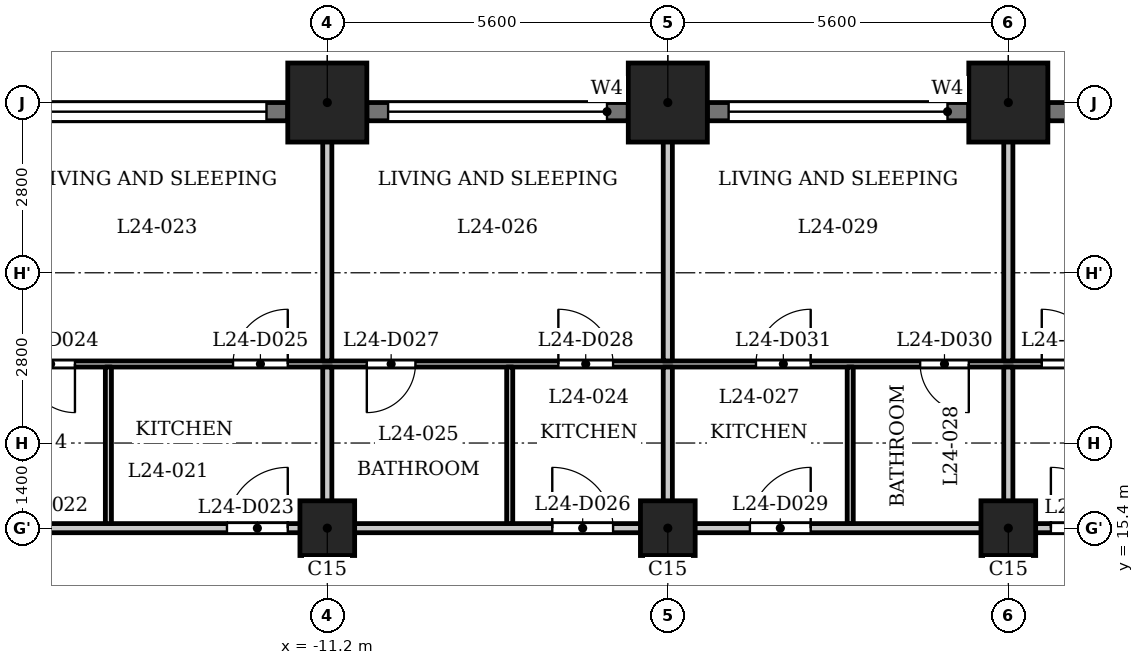
"""IFC4 building model, lengths in metres.
Left out: names, types, materials, properties, quantities, classifications, styles, units other than length and angle.
Written with IfcOpenShell. Run it as: python <this file> out.ifc"""

import sys

from ifc_helpers import new_model, si_unit, direction, frame, frame_2d, origin, origin_2d, place, context, subcontext, project, spatial, rectangle, extrude, element, fill, save


model = new_model("IFC4")
c1 = context("Model", 3, precision=1e-05, world=origin(), true_north=direction((0.0, 1.0)))
c2 = subcontext(c1, "Body", "Model", "MODEL_VIEW")
j1 = project(units=[si_unit("LENGTHUNIT", "METRE"), si_unit("PLANEANGLEUNIT", "RADIAN")], contexts=[c1])
p1 = place(None, origin())
s1 = spatial("IfcSite", under=j1, at=p1, CompositionType="ELEMENT")
p2 = place(p1, origin())
s2 = spatial("IfcBuilding", under=s1, at=p2, CompositionType="ELEMENT")
p3 = place(p2, frame((0.0, 0.0, 97.3)))
s3 = spatial("IfcBuildingStorey", under=s2, at=p3, CompositionType="ELEMENT", Elevation=97.3)
for number, where, z_axis, x_axis in (
    (1, (0.0, 22.4, 0.0), (0.0, 0.0, 1.0), (1.0, 0.0, 0.0)),
    (2, (-5.6, 22.4, 0.0), (0.0, 0.0, 1.0), (1.0, 0.0, 0.0)),
    (3, (-11.2, 22.4, 0.0), (0.0, 0.0, 1.0), (1.0, 0.0, 0.0)),
):
    element("IfcColumn", number, at=place(p3, frame(where, z_axis=z_axis, x_axis=x_axis)), inside=s3, PredefinedType="COLUMN", context=c2, shape_type="SweptSolid", body=[
        extrude(rectangle(XDim=1.3, YDim=1.3, at=origin_2d()), origin(), (0.0, 0.0, 1.0), 3.5),
    ])
for number, where, z_axis, x_axis in (
    (4, (-11.2, 15.4, 0.0), (0.0, 0.0, 1.0), (1.0, 0.0, 0.0)),
    (5, (-5.6, 15.4, 0.0), (0.0, 0.0, 1.0), (1.0, 0.0, 0.0)),
    (6, (0.0, 15.4, 0.0), (0.0, 0.0, 1.0), (1.0, 0.0, 0.0)),
):
    element("IfcColumn", number, at=place(p3, frame(where, z_axis=z_axis, x_axis=x_axis)), inside=s3, PredefinedType="COLUMN", context=c2, shape_type="SweptSolid", body=[
        extrude(rectangle(XDim=0.9, YDim=0.9, at=origin_2d()), origin(), (0.0, 0.0, 1.0), 3.5),
    ])
p4 = place(p3, frame((4.95, 22.25, 0.0), z_axis=(0.0, 0.0, 1.0), x_axis=(-1.0, 0.0, 0.0)))
e7 = element("IfcWall", 7, at=p4, inside=s3, PredefinedType="SOLIDWALL", context=c2, shape_type="SweptSolid", body=[
    extrude(rectangle(XDim=4.3, YDim=0.3, at=frame_2d((2.15, 0.0))), origin(), (0.0, 0.0, 1.0), 2.4),
])
p5 = place(p4, frame((0.35, 0.0, 1.2)))
e8 = element("IfcOpeningElement", 8, at=p5, cuts=e7, PredefinedType="OPENING", context=c2, shape_type="SweptSolid", body=[
    extrude(rectangle(XDim=3.6, YDim=0.95, at=frame_2d((1.8, 0.475))), frame((0.0, 0.16, 0.0), z_axis=(0.0, -1.0, 0.0), x_axis=(1.0, 0.0, 0.0)), (0.0, 0.0, 1.0), 0.32),
])
p6 = place(p3, frame((-0.65, 22.25, 0.0), z_axis=(0.0, 0.0, 1.0), x_axis=(-1.0, 0.0, 0.0)))
e9 = element("IfcWall", 9, at=p6, inside=s3, PredefinedType="SOLIDWALL", context=c2, shape_type="SweptSolid", body=[
    extrude(rectangle(XDim=4.3, YDim=0.3, at=frame_2d((2.15, 0.0))), origin(), (0.0, 0.0, 1.0), 2.4),
])
p7 = place(p6, frame((0.35, 0.0, 1.2)))
e10 = element("IfcOpeningElement", 10, at=p7, cuts=e9, PredefinedType="OPENING", context=c2, shape_type="SweptSolid", body=[
    extrude(rectangle(XDim=3.6, YDim=0.95, at=frame_2d((1.8, 0.475))), frame((0.0, 0.16, 0.0), z_axis=(0.0, -1.0, 0.0), x_axis=(1.0, 0.0, 0.0)), (0.0, 0.0, 1.0), 0.32),
])
p8 = place(p3, frame((-6.25, 22.25, 0.0), z_axis=(0.0, 0.0, 1.0), x_axis=(-1.0, 0.0, 0.0)))
e11 = element("IfcWall", 11, at=p8, inside=s3, PredefinedType="SOLIDWALL", context=c2, shape_type="SweptSolid", body=[
    extrude(rectangle(XDim=4.3, YDim=0.3, at=frame_2d((2.15, 0.0))), origin(), (0.0, 0.0, 1.0), 2.4),
])
p9 = place(p8, frame((0.35, 0.0, 1.2)))
e12 = element("IfcOpeningElement", 12, at=p9, cuts=e11, PredefinedType="OPENING", context=c2, shape_type="SweptSolid", body=[
    extrude(rectangle(XDim=3.6, YDim=0.95, at=frame_2d((1.8, 0.475))), frame((0.0, 0.16, 0.0), z_axis=(0.0, -1.0, 0.0), x_axis=(1.0, 0.0, 0.0)), (0.0, 0.0, 1.0), 0.32),
])
p10 = place(p3, frame((-11.85, 22.25, 0.0), z_axis=(0.0, 0.0, 1.0), x_axis=(-1.0, 0.0, 0.0)))
e13 = element("IfcWall", 13, at=p10, inside=s3, PredefinedType="SOLIDWALL", context=c2, shape_type="SweptSolid", body=[
    extrude(rectangle(XDim=4.3, YDim=0.3, at=frame_2d((2.15, 0.0))), origin(), (0.0, 0.0, 1.0), 2.4),
])
p11 = place(p10, frame((0.35, 0.0, 1.2)))
e14 = element("IfcOpeningElement", 14, at=p11, cuts=e13, PredefinedType="OPENING", context=c2, shape_type="SweptSolid", body=[
    extrude(rectangle(XDim=3.6, YDim=0.95, at=frame_2d((1.8, 0.475))), frame((0.0, 0.16, 0.0), z_axis=(0.0, -1.0, 0.0), x_axis=(1.0, 0.0, 0.0)), (0.0, 0.0, 1.0), 0.32),
])
p12 = place(p3, frame((-27.484, 15.4, 0.0), z_axis=(0.0, 0.0, 1.0), x_axis=(1.0, 0.0, 0.0)))
e15 = element("IfcWall", 15, at=p12, inside=s3, PredefinedType="PARTITIONING", context=c2, shape_type="SweptSolid", body=[
    extrude(rectangle(XDim=54.968, YDim=0.15, at=frame_2d((27.484, 0.0))), origin(), (0.0, 0.0, 1.0), 3.2),
])
p13 = place(p12, frame((9.034, 0.0, 0.0)))
e16 = element("IfcOpeningElement", 16, at=p13, cuts=e15, PredefinedType="OPENING", context=c2, shape_type="SweptSolid", body=[
    extrude(rectangle(XDim=1.0, YDim=2.1, at=frame_2d((0.5, 1.05))), frame((0.0, 0.085, 0.0), z_axis=(0.0, -1.0, 0.0), x_axis=(1.0, 0.0, 0.0)), (0.0, 0.0, 1.0), 0.17),
])
p14 = place(p12, frame((14.634, 0.0, 0.0)))
e17 = element("IfcOpeningElement", 17, at=p14, cuts=e15, PredefinedType="OPENING", context=c2, shape_type="SweptSolid", body=[
    extrude(rectangle(XDim=1.0, YDim=2.1, at=frame_2d((0.5, 1.05))), frame((0.0, 0.085, 0.0), z_axis=(0.0, -1.0, 0.0), x_axis=(1.0, 0.0, 0.0)), (0.0, 0.0, 1.0), 0.17),
])
p15 = place(p12, frame((19.984, 0.0, 0.0)))
e18 = element("IfcOpeningElement", 18, at=p15, cuts=e15, PredefinedType="OPENING", context=c2, shape_type="SweptSolid", body=[
    extrude(rectangle(XDim=1.0, YDim=2.1, at=frame_2d((0.5, 1.05))), frame((0.0, 0.085, 0.0), z_axis=(0.0, -1.0, 0.0), x_axis=(1.0, 0.0, 0.0)), (0.0, 0.0, 1.0), 0.17),
])
p16 = place(p12, frame((23.234, 0.0, 0.0)))
e19 = element("IfcOpeningElement", 19, at=p16, cuts=e15, PredefinedType="OPENING", context=c2, shape_type="SweptSolid", body=[
    extrude(rectangle(XDim=1.0, YDim=2.1, at=frame_2d((0.5, 1.05))), frame((0.0, 0.085, 0.0), z_axis=(0.0, -1.0, 0.0), x_axis=(1.0, 0.0, 0.0)), (0.0, 0.0, 1.0), 0.17),
])
p17 = place(p12, frame((28.184, 0.0, 0.0)))
e20 = element("IfcOpeningElement", 20, at=p17, cuts=e15, PredefinedType="OPENING", context=c2, shape_type="SweptSolid", body=[
    extrude(rectangle(XDim=1.0, YDim=2.1, at=frame_2d((0.5, 1.05))), frame((0.0, 0.085, 0.0), z_axis=(0.0, -1.0, 0.0), x_axis=(1.0, 0.0, 0.0)), (0.0, 0.0, 1.0), 0.17),
])
p18 = place(p12, frame((39.284, 0.0, 0.0)))
e21 = element("IfcOpeningElement", 21, at=p18, cuts=e15, PredefinedType="OPENING", context=c2, shape_type="SweptSolid", body=[
    extrude(rectangle(XDim=1.0, YDim=2.1, at=frame_2d((0.5, 1.05))), frame((0.0, 0.085, 0.0), z_axis=(0.0, -1.0, 0.0), x_axis=(1.0, 0.0, 0.0)), (0.0, 0.0, 1.0), 0.17),
])
p19 = place(p12, frame((48.234, 0.0, 0.0)))
e22 = element("IfcOpeningElement", 22, at=p19, cuts=e15, PredefinedType="OPENING", context=c2, shape_type="SweptSolid", body=[
    extrude(rectangle(XDim=1.0, YDim=2.1, at=frame_2d((0.5, 1.05))), frame((0.0, 0.085, 0.0), z_axis=(0.0, -1.0, 0.0), x_axis=(1.0, 0.0, 0.0)), (0.0, 0.0, 1.0), 0.17),
])
p20 = place(p3, frame((-26.44, 18.1, 0.0), z_axis=(0.0, 0.0, 1.0), x_axis=(1.0, 0.0, 0.0)))
e23 = element("IfcWall", 23, at=p20, inside=s3, PredefinedType="PARTITIONING", context=c2, shape_type="SweptSolid", body=[
    extrude(rectangle(XDim=52.63, YDim=0.1, at=frame_2d((26.315, 0.0))), origin(), (0.0, 0.0, 1.0), 3.2),
])
p21 = place(p20, frame((2.626, 0.0, 0.0)))
e24 = element("IfcOpeningElement", 24, at=p21, cuts=e23, PredefinedType="OPENING", context=c2, shape_type="SweptSolid", body=[
    extrude(rectangle(XDim=0.8, YDim=2.1, at=frame_2d((0.4, 1.05))), frame((0.0, 0.06, 0.0), z_axis=(0.0, -1.0, 0.0), x_axis=(1.0, 0.0, 0.0)), (0.0, 0.0, 1.0), 0.12),
])
p22 = place(p20, frame((8.09, 0.0, 0.0)))
e25 = element("IfcOpeningElement", 25, at=p22, cuts=e23, PredefinedType="OPENING", context=c2, shape_type="SweptSolid", body=[
    extrude(rectangle(XDim=0.9, YDim=2.1, at=frame_2d((0.45, 1.05))), frame((0.0, 0.06, 0.0), z_axis=(0.0, -1.0, 0.0), x_axis=(1.0, 0.0, 0.0)), (0.0, 0.0, 1.0), 0.12),
])
p23 = place(p20, frame((10.29, 0.0, 0.0)))
e26 = element("IfcOpeningElement", 26, at=p23, cuts=e23, PredefinedType="OPENING", context=c2, shape_type="SweptSolid", body=[
    extrude(rectangle(XDim=0.8, YDim=2.1, at=frame_2d((0.4, 1.05))), frame((0.0, 0.06, 0.0), z_axis=(0.0, -1.0, 0.0), x_axis=(1.0, 0.0, 0.0)), (0.0, 0.0, 1.0), 0.12),
])
p24 = place(p20, frame((13.69, 0.0, 0.0)))
e27 = element("IfcOpeningElement", 27, at=p24, cuts=e23, PredefinedType="OPENING", context=c2, shape_type="SweptSolid", body=[
    extrude(rectangle(XDim=0.9, YDim=2.1, at=frame_2d((0.45, 1.05))), frame((0.0, 0.06, 0.0), z_axis=(0.0, -1.0, 0.0), x_axis=(1.0, 0.0, 0.0)), (0.0, 0.0, 1.0), 0.12),
])
p25 = place(p20, frame((15.89, 0.0, 0.0)))
e28 = element("IfcOpeningElement", 28, at=p25, cuts=e23, PredefinedType="OPENING", context=c2, shape_type="SweptSolid", body=[
    extrude(rectangle(XDim=0.8, YDim=2.1, at=frame_2d((0.4, 1.05))), frame((0.0, 0.06, 0.0), z_axis=(0.0, -1.0, 0.0), x_axis=(1.0, 0.0, 0.0)), (0.0, 0.0, 1.0), 0.12),
])
p26 = place(p20, frame((19.04, 0.0, 0.0)))
e29 = element("IfcOpeningElement", 29, at=p26, cuts=e23, PredefinedType="OPENING", context=c2, shape_type="SweptSolid", body=[
    extrude(rectangle(XDim=0.9, YDim=2.1, at=frame_2d((0.45, 1.05))), frame((0.0, 0.06, 0.0), z_axis=(0.0, -1.0, 0.0), x_axis=(1.0, 0.0, 0.0)), (0.0, 0.0, 1.0), 0.12),
])
p27 = place(p20, frame((24.99, 0.0, 0.0)))
e30 = element("IfcOpeningElement", 30, at=p27, cuts=e23, PredefinedType="OPENING", context=c2, shape_type="SweptSolid", body=[
    extrude(rectangle(XDim=0.8, YDim=2.1, at=frame_2d((0.4, 1.05))), frame((0.0, 0.06, 0.0), z_axis=(0.0, -1.0, 0.0), x_axis=(1.0, 0.0, 0.0)), (0.0, 0.0, 1.0), 0.12),
])
p28 = place(p20, frame((22.29, 0.0, 0.0)))
e31 = element("IfcOpeningElement", 31, at=p28, cuts=e23, PredefinedType="OPENING", context=c2, shape_type="SweptSolid", body=[
    extrude(rectangle(XDim=0.9, YDim=2.1, at=frame_2d((0.45, 1.05))), frame((0.0, 0.06, 0.0), z_axis=(0.0, -1.0, 0.0), x_axis=(1.0, 0.0, 0.0)), (0.0, 0.0, 1.0), 0.12),
])
p29 = place(p20, frame((32.69, 0.0, 0.0)))
e32 = element("IfcOpeningElement", 32, at=p29, cuts=e23, PredefinedType="OPENING", context=c2, shape_type="SweptSolid", body=[
    extrude(rectangle(XDim=0.8, YDim=2.1, at=frame_2d((0.4, 1.05))), frame((0.0, 0.06, 0.0), z_axis=(0.0, -1.0, 0.0), x_axis=(1.0, 0.0, 0.0)), (0.0, 0.0, 1.0), 0.12),
])
p30 = place(p20, frame((26.99, 0.0, 0.0)))
e33 = element("IfcOpeningElement", 33, at=p30, cuts=e23, PredefinedType="OPENING", context=c2, shape_type="SweptSolid", body=[
    extrude(rectangle(XDim=0.9, YDim=2.1, at=frame_2d((0.45, 1.05))), frame((0.0, 0.06, 0.0), z_axis=(0.0, -1.0, 0.0), x_axis=(1.0, 0.0, 0.0)), (0.0, 0.0, 1.0), 0.12),
])
p31 = place(p20, frame((41.29, 0.0, 0.0)))
e34 = element("IfcOpeningElement", 34, at=p31, cuts=e23, PredefinedType="OPENING", context=c2, shape_type="SweptSolid", body=[
    extrude(rectangle(XDim=0.8, YDim=2.1, at=frame_2d((0.4, 1.05))), frame((0.0, 0.06, 0.0), z_axis=(0.0, -1.0, 0.0), x_axis=(1.0, 0.0, 0.0)), (0.0, 0.0, 1.0), 0.12),
])
p32 = place(p20, frame((38.34, 0.0, 0.0)))
e35 = element("IfcOpeningElement", 35, at=p32, cuts=e23, PredefinedType="OPENING", context=c2, shape_type="SweptSolid", body=[
    extrude(rectangle(XDim=0.9, YDim=2.1, at=frame_2d((0.45, 1.05))), frame((0.0, 0.06, 0.0), z_axis=(0.0, -1.0, 0.0), x_axis=(1.0, 0.0, 0.0)), (0.0, 0.0, 1.0), 0.12),
])
p33 = place(p20, frame((50.74, 0.0, 0.0)))
e36 = element("IfcOpeningElement", 36, at=p33, cuts=e23, PredefinedType="OPENING", context=c2, shape_type="SweptSolid", body=[
    extrude(rectangle(XDim=0.8, YDim=2.1, at=frame_2d((0.4, 1.05))), frame((0.0, 0.06, 0.0), z_axis=(0.0, -1.0, 0.0), x_axis=(1.0, 0.0, 0.0)), (0.0, 0.0, 1.0), 0.12),
])
p34 = place(p20, frame((47.29, 0.0, 0.0)))
e37 = element("IfcOpeningElement", 37, at=p34, cuts=e23, PredefinedType="OPENING", context=c2, shape_type="SweptSolid", body=[
    extrude(rectangle(XDim=0.9, YDim=2.1, at=frame_2d((0.45, 1.05))), frame((0.0, 0.06, 0.0), z_axis=(0.0, -1.0, 0.0), x_axis=(1.0, 0.0, 0.0)), (0.0, 0.0, 1.0), 0.12),
])
p35 = place(p3, frame((-14.8, 15.475, 0.0), z_axis=(0.0, 0.0, 1.0), x_axis=(0.0, 1.0, 0.0)))
e38 = element("IfcWall", 38, at=p35, inside=s3, PredefinedType="PARTITIONING", context=c2, shape_type="SweptSolid", body=[
    extrude(rectangle(XDim=2.575, YDim=0.1, at=frame_2d((1.288, 0.0))), origin(), (0.0, 0.0, 1.0), 3.2),
])
p36 = place(p3, frame((-11.2, 15.475, 0.0), z_axis=(0.0, 0.0, 1.0), x_axis=(0.0, 1.0, 0.0)))
e39 = element("IfcWall", 39, at=p36, inside=s3, PredefinedType="PARTITIONING", context=c2, shape_type="SweptSolid", body=[
    extrude(rectangle(XDim=2.575, YDim=0.15, at=frame_2d((1.288, 0.0))), origin(), (0.0, 0.0, 1.0), 3.2),
])
p37 = place(p3, frame((-11.2, 18.15, 0.0), z_axis=(0.0, 0.0, 1.0), x_axis=(0.0, 1.0, 0.0)))
e40 = element("IfcWall", 40, at=p37, inside=s3, PredefinedType="PARTITIONING", context=c2, shape_type="SweptSolid", body=[
    extrude(rectangle(XDim=4.88, YDim=0.15, at=frame_2d((2.44, 0.0))), origin(), (0.0, 0.0, 1.0), 3.2),
])
p38 = place(p3, frame((-8.2, 15.475, 0.0), z_axis=(0.0, 0.0, 1.0), x_axis=(0.0, 1.0, 0.0)))
e41 = element("IfcWall", 41, at=p38, inside=s3, PredefinedType="PARTITIONING", context=c2, shape_type="SweptSolid", body=[
    extrude(rectangle(XDim=2.575, YDim=0.1, at=frame_2d((1.288, 0.0))), origin(), (0.0, 0.0, 1.0), 3.2),
])
p39 = place(p3, frame((-5.6, 15.475, 0.0), z_axis=(0.0, 0.0, 1.0), x_axis=(0.0, 1.0, 0.0)))
e42 = element("IfcWall", 42, at=p39, inside=s3, PredefinedType="PARTITIONING", context=c2, shape_type="SweptSolid", body=[
    extrude(rectangle(XDim=2.575, YDim=0.15, at=frame_2d((1.288, 0.0))), origin(), (0.0, 0.0, 1.0), 3.2),
])
p40 = place(p3, frame((-5.6, 18.15, 0.0), z_axis=(0.0, 0.0, 1.0), x_axis=(0.0, 1.0, 0.0)))
e43 = element("IfcWall", 43, at=p40, inside=s3, PredefinedType="PARTITIONING", context=c2, shape_type="SweptSolid", body=[
    extrude(rectangle(XDim=4.88, YDim=0.15, at=frame_2d((2.44, 0.0))), origin(), (0.0, 0.0, 1.0), 3.2),
])
p41 = place(p3, frame((-2.6, 15.475, 0.0), z_axis=(0.0, 0.0, 1.0), x_axis=(0.0, 1.0, 0.0)))
e44 = element("IfcWall", 44, at=p41, inside=s3, PredefinedType="PARTITIONING", context=c2, shape_type="SweptSolid", body=[
    extrude(rectangle(XDim=2.575, YDim=0.1, at=frame_2d((1.288, 0.0))), origin(), (0.0, 0.0, 1.0), 3.2),
])
p42 = place(p3, frame((0.0, 15.475, 0.0), z_axis=(0.0, 0.0, 1.0), x_axis=(0.0, 1.0, 0.0)))
e45 = element("IfcWall", 45, at=p42, inside=s3, PredefinedType="PARTITIONING", context=c2, shape_type="SweptSolid", body=[
    extrude(rectangle(XDim=2.575, YDim=0.15, at=frame_2d((1.288, 0.0))), origin(), (0.0, 0.0, 1.0), 3.2),
])
p43 = place(p3, frame((0.0, 18.15, 0.0), z_axis=(0.0, 0.0, 1.0), x_axis=(0.0, 1.0, 0.0)))
e46 = element("IfcWall", 46, at=p43, inside=s3, PredefinedType="PARTITIONING", context=c2, shape_type="SweptSolid", body=[
    extrude(rectangle(XDim=4.88, YDim=0.15, at=frame_2d((2.44, 0.0))), origin(), (0.0, 0.0, 1.0), 3.2),
])
p44 = place(p14, origin())
e47 = element("IfcDoor", 47, at=p44, inside=s3, OperationType="SINGLE_SWING_LEFT", PredefinedType="DOOR", context=c2, shape_type="SweptSolid", body=[
    extrude(rectangle(XDim=1.0, YDim=2.1, at=frame_2d((0.5, 1.05))), frame((0.0, 0.025, 0.0), z_axis=(0.0, -1.0, 0.0), x_axis=(1.0, 0.0, 0.0)), (0.0, 0.0, 1.0), 0.05),
])
fill(e17, e47)
p45 = place(p23, origin())
e48 = element("IfcDoor", 48, at=p45, inside=s3, OperationType="SINGLE_SWING_RIGHT", PredefinedType="DOOR", context=c2, shape_type="SweptSolid", body=[
    extrude(rectangle(XDim=0.8, YDim=2.1, at=frame_2d((0.4, 1.05))), frame((0.0, 0.025, 0.0), z_axis=(0.0, -1.0, 0.0), x_axis=(1.0, 0.0, 0.0)), (0.0, 0.0, 1.0), 0.05),
])
fill(e26, e48)
p46 = place(p24, origin())
e49 = element("IfcDoor", 49, at=p46, inside=s3, OperationType="SINGLE_SWING_LEFT", PredefinedType="DOOR", context=c2, shape_type="SweptSolid", body=[
    extrude(rectangle(XDim=0.9, YDim=2.1, at=frame_2d((0.45, 1.05))), frame((0.0, 0.025, 0.0), z_axis=(0.0, -1.0, 0.0), x_axis=(1.0, 0.0, 0.0)), (0.0, 0.0, 1.0), 0.05),
])
fill(e27, e49)
p47 = place(p15, origin())
e50 = element("IfcDoor", 50, at=p47, inside=s3, OperationType="SINGLE_SWING_RIGHT", PredefinedType="DOOR", context=c2, shape_type="SweptSolid", body=[
    extrude(rectangle(XDim=1.0, YDim=2.1, at=frame_2d((0.5, 1.05))), frame((0.0, 0.025, 0.0), z_axis=(0.0, -1.0, 0.0), x_axis=(1.0, 0.0, 0.0)), (0.0, 0.0, 1.0), 0.05),
])
fill(e18, e50)
p48 = place(p25, origin())
e51 = element("IfcDoor", 51, at=p48, inside=s3, OperationType="SINGLE_SWING_LEFT", PredefinedType="DOOR", context=c2, shape_type="SweptSolid", body=[
    extrude(rectangle(XDim=0.8, YDim=2.1, at=frame_2d((0.4, 1.05))), frame((0.0, 0.025, 0.0), z_axis=(0.0, -1.0, 0.0), x_axis=(1.0, 0.0, 0.0)), (0.0, 0.0, 1.0), 0.05),
])
fill(e28, e51)
p49 = place(p26, origin())
e52 = element("IfcDoor", 52, at=p49, inside=s3, OperationType="SINGLE_SWING_RIGHT", PredefinedType="DOOR", context=c2, shape_type="SweptSolid", body=[
    extrude(rectangle(XDim=0.9, YDim=2.1, at=frame_2d((0.45, 1.05))), frame((0.0, 0.025, 0.0), z_axis=(0.0, -1.0, 0.0), x_axis=(1.0, 0.0, 0.0)), (0.0, 0.0, 1.0), 0.05),
])
fill(e29, e52)
p50 = place(p16, origin())
e53 = element("IfcDoor", 53, at=p50, inside=s3, OperationType="SINGLE_SWING_LEFT", PredefinedType="DOOR", context=c2, shape_type="SweptSolid", body=[
    extrude(rectangle(XDim=1.0, YDim=2.1, at=frame_2d((0.5, 1.05))), frame((0.0, 0.025, 0.0), z_axis=(0.0, -1.0, 0.0), x_axis=(1.0, 0.0, 0.0)), (0.0, 0.0, 1.0), 0.05),
])
fill(e19, e53)
p51 = place(p27, origin())
e54 = element("IfcDoor", 54, at=p51, inside=s3, OperationType="SINGLE_SWING_RIGHT", PredefinedType="DOOR", context=c2, shape_type="SweptSolid", body=[
    extrude(rectangle(XDim=0.8, YDim=2.1, at=frame_2d((0.4, 1.05))), frame((0.0, 0.025, 0.0), z_axis=(0.0, -1.0, 0.0), x_axis=(1.0, 0.0, 0.0)), (0.0, 0.0, 1.0), 0.05),
])
fill(e30, e54)
p52 = place(p28, origin())
e55 = element("IfcDoor", 55, at=p52, inside=s3, OperationType="SINGLE_SWING_LEFT", PredefinedType="DOOR", context=c2, shape_type="SweptSolid", body=[
    extrude(rectangle(XDim=0.9, YDim=2.1, at=frame_2d((0.45, 1.05))), frame((0.0, 0.025, 0.0), z_axis=(0.0, -1.0, 0.0), x_axis=(1.0, 0.0, 0.0)), (0.0, 0.0, 1.0), 0.05),
])
fill(e31, e55)
p53 = place(p17, origin())
e56 = element("IfcDoor", 56, at=p53, inside=s3, OperationType="SINGLE_SWING_RIGHT", PredefinedType="DOOR", context=c2, shape_type="SweptSolid", body=[
    extrude(rectangle(XDim=1.0, YDim=2.1, at=frame_2d((0.5, 1.05))), frame((0.0, 0.025, 0.0), z_axis=(0.0, -1.0, 0.0), x_axis=(1.0, 0.0, 0.0)), (0.0, 0.0, 1.0), 0.05),
])
fill(e20, e56)
p54 = place(p30, origin())
e57 = element("IfcDoor", 57, at=p54, inside=s3, OperationType="SINGLE_SWING_RIGHT", PredefinedType="DOOR", context=c2, shape_type="SweptSolid", body=[
    extrude(rectangle(XDim=0.9, YDim=2.1, at=frame_2d((0.45, 1.05))), frame((0.0, 0.025, 0.0), z_axis=(0.0, -1.0, 0.0), x_axis=(1.0, 0.0, 0.0)), (0.0, 0.0, 1.0), 0.05),
])
fill(e33, e57)
p55 = place(p7, origin())
e58 = element("IfcWindow", 58, at=p55, inside=s3, PartitioningType="SINGLE_PANEL", PredefinedType="WINDOW", context=c2, shape_type="SweptSolid", body=[
    extrude(rectangle(XDim=3.6, YDim=0.95, at=frame_2d((1.8, 0.475))), frame((0.0, 0.03, 0.0), z_axis=(0.0, -1.0, 0.0), x_axis=(1.0, 0.0, 0.0)), (0.0, 0.0, 1.0), 0.06),
])
fill(e10, e58)
p56 = place(p9, origin())
e59 = element("IfcWindow", 59, at=p56, inside=s3, PartitioningType="SINGLE_PANEL", PredefinedType="WINDOW", context=c2, shape_type="SweptSolid", body=[
    extrude(rectangle(XDim=3.6, YDim=0.95, at=frame_2d((1.8, 0.475))), frame((0.0, 0.03, 0.0), z_axis=(0.0, -1.0, 0.0), x_axis=(1.0, 0.0, 0.0)), (0.0, 0.0, 1.0), 0.06),
])
fill(e12, e59)
p57 = place(p11, origin())
e60 = element("IfcWindow", 60, at=p57, inside=s3, PartitioningType="SINGLE_PANEL", PredefinedType="WINDOW", context=c2, shape_type="SweptSolid", body=[
    extrude(rectangle(XDim=3.6, YDim=0.95, at=frame_2d((1.8, 0.475))), frame((0.0, 0.03, 0.0), z_axis=(0.0, -1.0, 0.0), x_axis=(1.0, 0.0, 0.0)), (0.0, 0.0, 1.0), 0.06),
])
fill(e14, e60)
save(model, sys.argv[1])
